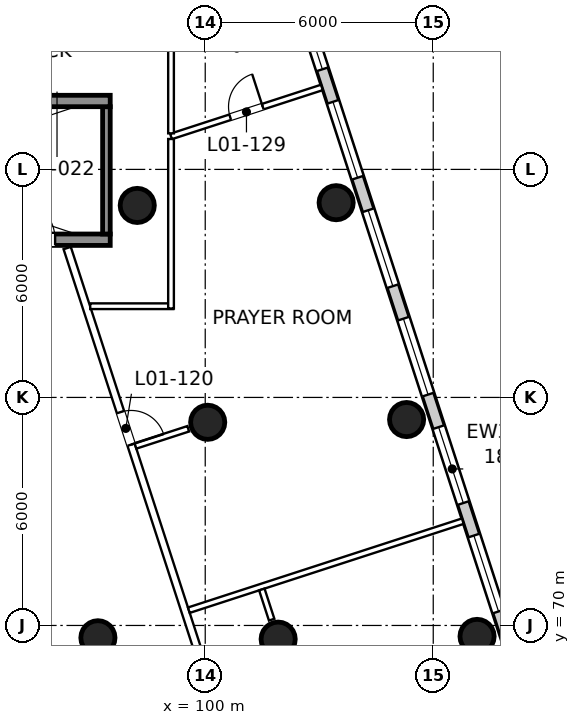
"""IFC4 building model, lengths in metres.
Left out: names, types, materials, properties, quantities, classifications, styles, units other than length and angle.
Written with IfcOpenShell. Run it as: python <this file> out.ifc"""

import sys

from ifc_helpers import new_model, si_unit, direction, frame, frame_2d, origin, origin_2d, place, context, subcontext, project, spatial, rectangle, circle, extrude, element, fill, save


model = new_model("IFC4")
c1 = context("Model", 3, precision=1e-05, world=origin(), true_north=direction((0.0, 1.0)))
c2 = subcontext(c1, "Body", "Model", "MODEL_VIEW")
j1 = project(units=[si_unit("LENGTHUNIT", "METRE"), si_unit("PLANEANGLEUNIT", "RADIAN")], contexts=[c1])
p1 = place(None, origin())
s1 = spatial("IfcSite", under=j1, at=p1, CompositionType="ELEMENT")
p2 = place(p1, origin())
s2 = spatial("IfcBuilding", under=s1, at=p2, CompositionType="ELEMENT")
p3 = place(p2, frame((0.0, 0.0, 9.0)))
s3 = spatial("IfcBuildingStorey", under=s2, at=p3, CompositionType="ELEMENT", Elevation=9.0)
for number, where, z_axis, x_axis in (
    (1, (107.153, 69.712, 0.0), (0.0, 0.0, 1.0), (1.0, 0.0, 0.0)),
    (2, (105.299, 75.418, 0.0), (0.0, 0.0, 1.0), (1.0, 0.0, 0.0)),
    (3, (103.445, 81.124, 0.0), (0.0, 0.0, 1.0), (1.0, 0.0, 0.0)),
    (4, (101.919, 69.64, 0.0), (0.0, 0.0, 1.0), (1.0, 0.0, 0.0)),
    (5, (100.065, 75.346, 0.0), (0.0, 0.0, 1.0), (1.0, 0.0, 0.0)),
    (6, (98.211, 81.052, 0.0), (0.0, 0.0, 1.0), (1.0, 0.0, 0.0)),
    (7, (97.176, 69.676, 0.0), (0.0, 0.0, 1.0), (1.0, 0.0, 0.0)),
):
    element("IfcColumn", number, at=place(p3, frame(where, z_axis=z_axis, x_axis=x_axis)), inside=s3, PredefinedType="COLUMN", context=c2, shape_type="SweptSolid", body=[
        extrude(circle(Radius=0.45, at=origin_2d()), origin(), (0.0, 0.0, 1.0), 6.0),
    ])
p4 = place(p3, frame((110.912, 60.539, 0.0), z_axis=(0.0, 0.0, 1.0), x_axis=(-0.309016476183, 0.951056684666, 0.0)))
e8 = element("IfcWall", 8, at=p4, inside=s3, PredefinedType="SOLIDWALL", context=c2, shape_type="SweptSolid", body=[
    extrude(rectangle(XDim=28.556, YDim=0.32, at=frame_2d((14.278, 0.0))), origin(), (0.0, 0.0, 1.0), 5.65),
])
p5 = place(p4, frame((1.335, 0.0, 0.9)))
e9 = element("IfcOpeningElement", 9, at=p5, cuts=e8, PredefinedType="OPENING", context=c2, shape_type="SweptSolid", body=[
    extrude(rectangle(XDim=2.1, YDim=3.0, at=frame_2d((1.05, 1.5))), frame((0.0, 0.17, 0.0), z_axis=(0.0, -1.0, 0.0), x_axis=(1.0, 0.0, 0.0)), (0.0, 0.0, 1.0), 0.34),
])
p6 = place(p4, frame((4.335, 0.0, 0.9)))
e10 = element("IfcOpeningElement", 10, at=p6, cuts=e8, PredefinedType="OPENING", context=c2, shape_type="SweptSolid", body=[
    extrude(rectangle(XDim=2.1, YDim=3.0, at=frame_2d((1.05, 1.5))), frame((0.0, 0.17, 0.0), z_axis=(0.0, -1.0, 0.0), x_axis=(1.0, 0.0, 0.0)), (0.0, 0.0, 1.0), 0.34),
])
p7 = place(p4, frame((7.335, 0.0, 0.9)))
e11 = element("IfcOpeningElement", 11, at=p7, cuts=e8, PredefinedType="OPENING", context=c2, shape_type="SweptSolid", body=[
    extrude(rectangle(XDim=2.1, YDim=3.0, at=frame_2d((1.05, 1.5))), frame((0.0, 0.17, 0.0), z_axis=(0.0, -1.0, 0.0), x_axis=(1.0, 0.0, 0.0)), (0.0, 0.0, 1.0), 0.34),
])
p8 = place(p4, frame((10.335, 0.0, 0.9)))
e12 = element("IfcOpeningElement", 12, at=p8, cuts=e8, PredefinedType="OPENING", context=c2, shape_type="SweptSolid", body=[
    extrude(rectangle(XDim=2.1, YDim=3.0, at=frame_2d((1.05, 1.5))), frame((0.0, 0.17, 0.0), z_axis=(0.0, -1.0, 0.0), x_axis=(1.0, 0.0, 0.0)), (0.0, 0.0, 1.0), 0.34),
])
p9 = place(p4, frame((13.335, 0.0, 0.9)))
e13 = element("IfcOpeningElement", 13, at=p9, cuts=e8, PredefinedType="OPENING", context=c2, shape_type="SweptSolid", body=[
    extrude(rectangle(XDim=2.1, YDim=3.0, at=frame_2d((1.05, 1.5))), frame((0.0, 0.17, 0.0), z_axis=(0.0, -1.0, 0.0), x_axis=(1.0, 0.0, 0.0)), (0.0, 0.0, 1.0), 0.34),
])
p10 = place(p4, frame((16.335, 0.0, 0.9)))
e14 = element("IfcOpeningElement", 14, at=p10, cuts=e8, PredefinedType="OPENING", context=c2, shape_type="SweptSolid", body=[
    extrude(rectangle(XDim=2.1, YDim=3.0, at=frame_2d((1.05, 1.5))), frame((0.0, 0.17, 0.0), z_axis=(0.0, -1.0, 0.0), x_axis=(1.0, 0.0, 0.0)), (0.0, 0.0, 1.0), 0.34),
])
p11 = place(p4, frame((19.335, 0.0, 0.9)))
e15 = element("IfcOpeningElement", 15, at=p11, cuts=e8, PredefinedType="OPENING", context=c2, shape_type="SweptSolid", body=[
    extrude(rectangle(XDim=2.1, YDim=3.0, at=frame_2d((1.05, 1.5))), frame((0.0, 0.17, 0.0), z_axis=(0.0, -1.0, 0.0), x_axis=(1.0, 0.0, 0.0)), (0.0, 0.0, 1.0), 0.34),
])
p12 = place(p4, frame((22.335, 0.0, 0.9)))
e16 = element("IfcOpeningElement", 16, at=p12, cuts=e8, PredefinedType="OPENING", context=c2, shape_type="SweptSolid", body=[
    extrude(rectangle(XDim=2.1, YDim=3.0, at=frame_2d((1.05, 1.5))), frame((0.0, 0.17, 0.0), z_axis=(0.0, -1.0, 0.0), x_axis=(1.0, 0.0, 0.0)), (0.0, 0.0, 1.0), 0.34),
])
p13 = place(p4, frame((25.335, 0.0, 0.9)))
e17 = element("IfcOpeningElement", 17, at=p13, cuts=e8, PredefinedType="OPENING", context=c2, shape_type="SweptSolid", body=[
    extrude(rectangle(XDim=2.1, YDim=3.0, at=frame_2d((1.05, 1.5))), frame((0.0, 0.17, 0.0), z_axis=(0.0, -1.0, 0.0), x_axis=(1.0, 0.0, 0.0)), (0.0, 0.0, 1.0), 0.34),
])
p14 = place(p3, frame((85.6, 80.15, 0.0), z_axis=(0.0, 0.0, 1.0), x_axis=(1.0, 0.0, 0.0)))
e18 = element("IfcWall", 18, at=p14, inside=s3, PredefinedType="SHEAR", context=c2, shape_type="SweptSolid", body=[
    extrude(rectangle(XDim=11.9, YDim=0.3, at=frame_2d((5.95, 0.0))), origin(), (0.0, 0.0, 1.0), 6.0),
])
p15 = place(p14, frame((9.35, 0.0, 0.0)))
e19 = element("IfcOpeningElement", 19, at=p15, cuts=e18, PredefinedType="OPENING", context=c2, shape_type="SweptSolid", body=[
    extrude(rectangle(XDim=1.1, YDim=2.1, at=frame_2d((0.55, 1.05))), frame((0.0, 0.16, 0.0), z_axis=(0.0, -1.0, 0.0), x_axis=(1.0, 0.0, 0.0)), (0.0, 0.0, 1.0), 0.32),
])
p16 = place(p3, frame((97.4, 80.3, 0.0), z_axis=(0.0, 0.0, 1.0), x_axis=(0.0, 1.0, 0.0)))
e20 = element("IfcWall", 20, at=p16, inside=s3, PredefinedType="SHEAR", context=c2, shape_type="SweptSolid", body=[
    extrude(rectangle(XDim=3.35, YDim=0.2, at=frame_2d((1.675, 0.0))), origin(), (0.0, 0.0, 1.0), 6.0),
])
p17 = place(p3, frame((85.6, 83.8, 0.0), z_axis=(0.0, 0.0, 1.0), x_axis=(1.0, 0.0, 0.0)))
e21 = element("IfcWall", 21, at=p17, inside=s3, PredefinedType="SHEAR", context=c2, shape_type="SweptSolid", body=[
    extrude(rectangle(XDim=11.9, YDim=0.3, at=frame_2d((5.95, 0.0))), origin(), (0.0, 0.0, 1.0), 6.0),
])
p18 = place(p3, frame((96.368, 79.931, 0.0), z_axis=(0.0, 0.0, 1.0), x_axis=(0.309014892187, -0.951057199335, 0.0)))
e22 = element("IfcWall", 22, at=p18, inside=s3, PredefinedType="PARTITIONING", context=c2, shape_type="SweptSolid", body=[
    extrude(rectangle(XDim=18.769, YDim=0.2, at=frame_2d((9.384, 0.0))), origin(), (0.0, 0.0, 1.0), 5.65),
])
p19 = place(p18, frame((14.029, 0.0, 0.0)))
e23 = element("IfcOpeningElement", 23, at=p19, cuts=e22, PredefinedType="OPENING", context=c2, shape_type="SweptSolid", body=[
    extrude(rectangle(XDim=0.9, YDim=2.1, at=frame_2d((0.45, 1.05))), frame((0.0, 0.11, 0.0), z_axis=(0.0, -1.0, 0.0), x_axis=(1.0, 0.0, 0.0)), (0.0, 0.0, 1.0), 0.22),
])
p20 = place(p18, frame((4.54, 0.0, 0.0)))
e24 = element("IfcOpeningElement", 24, at=p20, cuts=e22, PredefinedType="OPENING", context=c2, shape_type="SweptSolid", body=[
    extrude(rectangle(XDim=0.9, YDim=2.1, at=frame_2d((0.45, 1.05))), frame((0.0, 0.11, 0.0), z_axis=(0.0, -1.0, 0.0), x_axis=(1.0, 0.0, 0.0)), (0.0, 0.0, 1.0), 0.22),
])
p21 = place(p3, frame((106.778, 72.744, 0.0), z_axis=(0.0, 0.0, 1.0), x_axis=(-0.951058681979, -0.309010329007, 0.0)))
e25 = element("IfcWall", 25, at=p21, inside=s3, PredefinedType="PARTITIONING", context=c2, shape_type="SweptSolid", body=[
    extrude(rectangle(XDim=7.58, YDim=0.15, at=frame_2d((3.79, 0.0))), origin(), (0.0, 0.0, 1.0), 4.95),
])
p22 = place(p3, frame((103.07, 84.157, 0.0), z_axis=(0.0, 0.0, 1.0), x_axis=(-0.951059855583, -0.309006716915, 0.0)))
e26 = element("IfcWall", 26, at=p22, inside=s3, PredefinedType="PARTITIONING", context=c2, shape_type="SweptSolid", body=[
    extrude(rectangle(XDim=4.174, YDim=0.15, at=frame_2d((2.087, 0.0))), origin(), (0.0, 0.0, 1.0), 4.95),
])
p23 = place(p22, frame((1.637, 0.0, 0.0)))
e27 = element("IfcOpeningElement", 27, at=p23, cuts=e26, PredefinedType="OPENING", context=c2, shape_type="SweptSolid", body=[
    extrude(rectangle(XDim=0.9, YDim=2.1, at=frame_2d((0.45, 1.05))), frame((0.0, 0.085, 0.0), z_axis=(0.0, -1.0, 0.0), x_axis=(1.0, 0.0, 0.0)), (0.0, 0.0, 1.0), 0.17),
])
p24 = place(p3, frame((101.748, 70.152, 0.0), z_axis=(0.0, 0.0, 1.0), x_axis=(-0.309033234433, 0.951051239427, 0.0)))
e28 = element("IfcWall", 28, at=p24, inside=s3, PredefinedType="PARTITIONING", context=c2, shape_type="SweptSolid", body=[
    extrude(rectangle(XDim=0.836, YDim=0.15, at=frame_2d((0.418, 0.0))), origin(), (0.0, 0.0, 1.0), 4.95),
])
p25 = place(p3, frame((99.553, 75.175, 0.0), z_axis=(0.0, 0.0, 1.0), x_axis=(-0.951096728911, -0.308893205257, 0.0)))
e29 = element("IfcWall", 29, at=p25, inside=s3, PredefinedType="PARTITIONING", context=c2, shape_type="SweptSolid", body=[
    extrude(rectangle(XDim=1.46, YDim=0.15, at=frame_2d((0.73, 0.0))), origin(), (0.0, 0.0, 1.0), 5.65),
])
p26 = place(p3, frame((99.1, 82.949, 0.0), z_axis=(0.0, 0.0, 1.0), x_axis=(0.0, 1.0, 0.0)))
e30 = element("IfcWall", 30, at=p26, inside=s3, PredefinedType="PARTITIONING", context=c2, shape_type="SweptSolid", body=[
    extrude(rectangle(XDim=2.661, YDim=0.15, at=frame_2d((1.331, 0.0))), origin(), (0.0, 0.0, 1.0), 5.65),
])
p27 = place(p3, frame((96.973, 78.4, 0.0), z_axis=(0.0, 0.0, 1.0), x_axis=(1.0, 0.0, 0.0)))
e31 = element("IfcWall", 31, at=p27, inside=s3, PredefinedType="PARTITIONING", context=c2, shape_type="SweptSolid", body=[
    extrude(rectangle(XDim=2.187, YDim=0.15, at=frame_2d((1.093, 0.0))), origin(), (0.0, 0.0, 1.0), 4.95),
])
p28 = place(p3, frame((99.1, 78.34, 0.0), z_axis=(0.0, 0.0, 1.0), x_axis=(0.0, 1.0, 0.0)))
e32 = element("IfcWall", 32, at=p28, inside=s3, PredefinedType="PARTITIONING", context=c2, shape_type="SweptSolid", body=[
    extrude(rectangle(XDim=4.46, YDim=0.15, at=frame_2d((2.23, 0.0))), origin(), (0.0, 0.0, 1.0), 4.95),
])
p29 = place(p8, origin())
e33 = element("IfcWindow", 33, at=p29, inside=s3, PartitioningType="SINGLE_PANEL", PredefinedType="WINDOW", context=c2, shape_type="SweptSolid", body=[
    extrude(rectangle(XDim=2.1, YDim=3.0, at=frame_2d((1.05, 1.5))), frame((0.0, 0.07, 0.0), z_axis=(0.0, -1.0, 0.0), x_axis=(1.0, 0.0, 0.0)), (0.0, 0.0, 1.0), 0.06),
])
fill(e12, e33)
p30 = place(p9, origin())
e34 = element("IfcWindow", 34, at=p30, inside=s3, PartitioningType="SINGLE_PANEL", PredefinedType="WINDOW", context=c2, shape_type="SweptSolid", body=[
    extrude(rectangle(XDim=2.1, YDim=3.0, at=frame_2d((1.05, 1.5))), frame((0.0, 0.07, 0.0), z_axis=(0.0, -1.0, 0.0), x_axis=(1.0, 0.0, 0.0)), (0.0, 0.0, 1.0), 0.06),
])
fill(e13, e34)
p31 = place(p10, origin())
e35 = element("IfcWindow", 35, at=p31, inside=s3, PartitioningType="SINGLE_PANEL", PredefinedType="WINDOW", context=c2, shape_type="SweptSolid", body=[
    extrude(rectangle(XDim=2.1, YDim=3.0, at=frame_2d((1.05, 1.5))), frame((0.0, 0.07, 0.0), z_axis=(0.0, -1.0, 0.0), x_axis=(1.0, 0.0, 0.0)), (0.0, 0.0, 1.0), 0.06),
])
fill(e14, e35)
p32 = place(p11, origin())
e36 = element("IfcWindow", 36, at=p32, inside=s3, PartitioningType="SINGLE_PANEL", PredefinedType="WINDOW", context=c2, shape_type="SweptSolid", body=[
    extrude(rectangle(XDim=2.1, YDim=3.0, at=frame_2d((1.05, 1.5))), frame((0.0, 0.07, 0.0), z_axis=(0.0, -1.0, 0.0), x_axis=(1.0, 0.0, 0.0)), (0.0, 0.0, 1.0), 0.06),
])
fill(e15, e36)
p33 = place(p12, origin())
e37 = element("IfcWindow", 37, at=p33, inside=s3, PartitioningType="SINGLE_PANEL", PredefinedType="WINDOW", context=c2, shape_type="SweptSolid", body=[
    extrude(rectangle(XDim=2.1, YDim=3.0, at=frame_2d((1.05, 1.5))), frame((0.0, 0.07, 0.0), z_axis=(0.0, -1.0, 0.0), x_axis=(1.0, 0.0, 0.0)), (0.0, 0.0, 1.0), 0.06),
])
fill(e16, e37)
p34 = place(p13, origin())
e38 = element("IfcWindow", 38, at=p34, inside=s3, PartitioningType="SINGLE_PANEL", PredefinedType="WINDOW", context=c2, shape_type="SweptSolid", body=[
    extrude(rectangle(XDim=2.1, YDim=3.0, at=frame_2d((1.05, 1.5))), frame((0.0, 0.07, 0.0), z_axis=(0.0, -1.0, 0.0), x_axis=(1.0, 0.0, 0.0)), (0.0, 0.0, 1.0), 0.06),
])
fill(e17, e38)
p35 = place(p15, origin())
e39 = element("IfcDoor", 39, at=p35, inside=s3, OperationType="SINGLE_SWING_LEFT", PredefinedType="DOOR", context=c2, shape_type="SweptSolid", body=[
    extrude(rectangle(XDim=1.1, YDim=2.1, at=frame_2d((0.55, 1.05))), frame((0.0, 0.025, 0.0), z_axis=(0.0, -1.0, 0.0), x_axis=(1.0, 0.0, 0.0)), (0.0, 0.0, 1.0), 0.05),
])
fill(e19, e39)
p36 = place(p20, origin())
e40 = element("IfcDoor", 40, at=p36, inside=s3, OperationType="SINGLE_SWING_RIGHT", PredefinedType="DOOR", context=c2, shape_type="SweptSolid", body=[
    extrude(rectangle(XDim=0.9, YDim=2.1, at=frame_2d((0.45, 1.05))), frame((0.0, 0.025, 0.0), z_axis=(0.0, -1.0, 0.0), x_axis=(1.0, 0.0, 0.0)), (0.0, 0.0, 1.0), 0.05),
])
fill(e24, e40)
p37 = place(p23, frame((0.9, 0.0, 0.0), z_axis=(0.0, 0.0, 1.0), x_axis=(-1.0, 0.0, 0.0)))
e41 = element("IfcDoor", 41, at=p37, inside=s3, OperationType="SINGLE_SWING_RIGHT", PredefinedType="DOOR", context=c2, shape_type="SweptSolid", body=[
    extrude(rectangle(XDim=0.9, YDim=2.1, at=frame_2d((0.45, 1.05))), frame((0.0, 0.025, 0.0), z_axis=(0.0, -1.0, 0.0), x_axis=(1.0, 0.0, 0.0)), (0.0, 0.0, 1.0), 0.05),
])
fill(e27, e41)
save(model, sys.argv[1])
